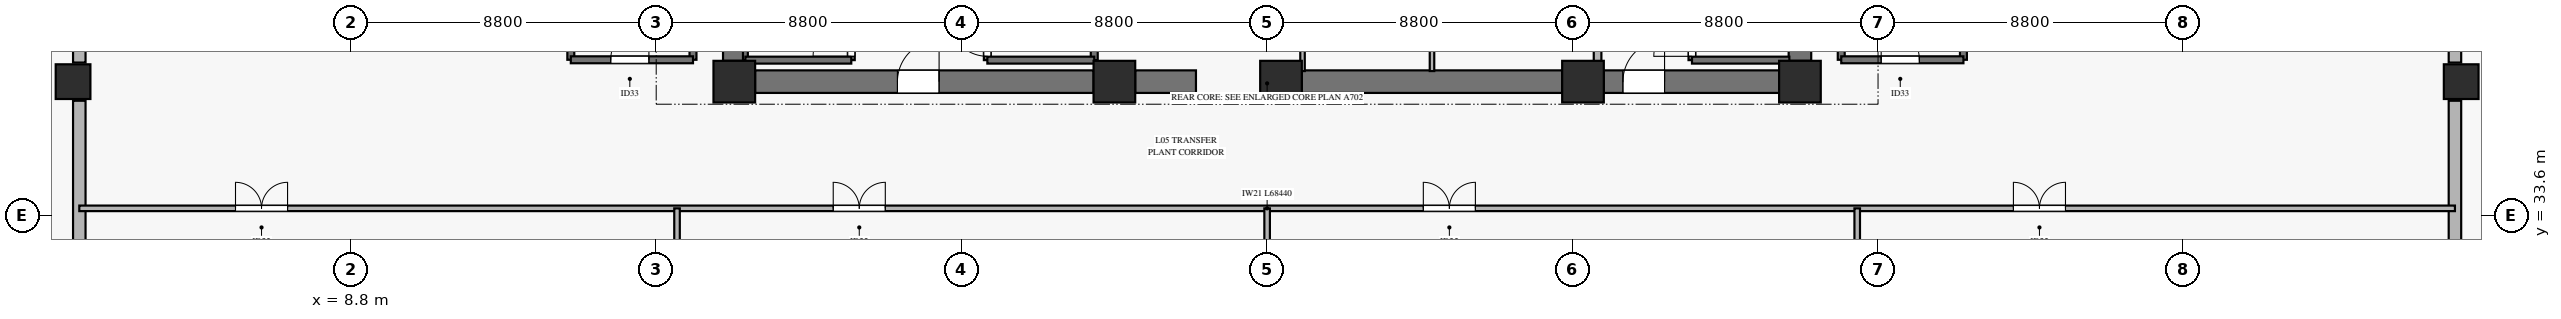
"""IFC4 building model, lengths in metres.
Left out: names, types, materials, properties, quantities, classifications, styles, units other than length and angle.
Written with IfcOpenShell. Run it as: python <this file> out.ifc"""

import sys

from ifc_helpers import new_model, si_unit, direction, frame, frame_2d, origin, origin_2d, place, context, subcontext, project, spatial, rectangle, hollow_rectangle, extrude, source, transform, mapped, element, fill, save


model = new_model("IFC4")
c1 = context("Model", 3, precision=1e-05, world=origin(), true_north=direction((0.0, 1.0)))
c2 = subcontext(c1, "Body", "Model", "MODEL_VIEW")
j1 = project(units=[si_unit("LENGTHUNIT", "METRE"), si_unit("PLANEANGLEUNIT", "RADIAN")], contexts=[c1])
p1 = place(None, origin())
s1 = spatial("IfcSite", under=j1, at=p1, CompositionType="ELEMENT")
p2 = place(p1, origin())
s2 = spatial("IfcBuilding", under=s1, at=p2, CompositionType="ELEMENT")
p3 = place(p2, frame((0.0, 0.0, 20.2)))
s3 = spatial("IfcBuildingStorey", under=s2, at=p3, CompositionType="ELEMENT", Elevation=20.2)
m1 = source(origin(), c2, "Body", "SweptSolid", [
    extrude(rectangle(XDim=1.2, YDim=1.2, at=origin_2d()), origin(), (0.0, 0.0, 1.0), 4.98),
])
for number, where, z_axis, x_axis in (
    (1, (19.85, 37.45, 0.0), (0.0, 0.0, 1.0), (1.0, 0.0, 0.0)),
    (2, (30.8, 37.45, 0.0), (0.0, 0.0, 1.0), (1.0, 0.0, 0.0)),
    (3, (35.6, 37.45, 0.0), (0.0, 0.0, 1.0), (1.0, 0.0, 0.0)),
    (4, (44.3, 37.45, 0.0), (0.0, 0.0, 1.0), (1.0, 0.0, 0.0)),
    (5, (50.55, 37.45, 0.0), (0.0, 0.0, 1.0), (1.0, 0.0, 0.0)),
):
    element("IfcColumn", number, at=place(p3, frame(where, z_axis=z_axis, x_axis=x_axis)), inside=s3, PredefinedType="PILASTER", context=c2, shape_type="MappedRepresentation", body=[
        mapped(m1, transform((0.0, 0.0, 0.0), x_axis=(1.0, 0.0, 0.0), y_axis=(0.0, 1.0, 0.0), z_axis=(0.0, 0.0, 1.0), scale=1.0)),
    ])
p4 = place(p3, frame((20.45, 37.45, 0.0), z_axis=(0.0, 0.0, 1.0), x_axis=(1.0, 0.0, 0.0)))
e6 = element("IfcWall", 6, at=p4, inside=s3, PredefinedType="SHEAR", context=c2, shape_type="SweptSolid", body=[
    extrude(rectangle(XDim=9.75, YDim=0.65, at=frame_2d((4.875, 0.0))), origin(), (0.0, 0.0, 1.0), 4.98),
])
p5 = place(p4, frame((4.1, 0.0, 0.0)))
e7 = element("IfcOpeningElement", 7, at=p5, cuts=e6, PredefinedType="OPENING", context=c2, shape_type="SweptSolid", body=[
    extrude(rectangle(XDim=1.2, YDim=2.15, at=frame_2d((0.6, 1.075))), frame((0.0, 0.335, 0.0), z_axis=(0.0, -1.0, 0.0), x_axis=(1.0, 0.0, 0.0)), (0.0, 0.0, 1.0), 0.67),
])
p6 = place(p3, frame((31.4, 37.45, 0.0), z_axis=(0.0, 0.0, 1.0), x_axis=(1.0, 0.0, 0.0)))
e8 = element("IfcWall", 8, at=p6, inside=s3, PredefinedType="SHEAR", context=c2, shape_type="SweptSolid", body=[
    extrude(rectangle(XDim=1.75, YDim=0.65, at=frame_2d((0.875, 0.0))), origin(), (0.0, 0.0, 1.0), 4.98),
])
p7 = place(p3, frame((36.2, 37.45, 0.0), z_axis=(0.0, 0.0, 1.0), x_axis=(1.0, 0.0, 0.0)))
e9 = element("IfcWall", 9, at=p7, inside=s3, PredefinedType="SHEAR", context=c2, shape_type="SweptSolid", body=[
    extrude(rectangle(XDim=7.5, YDim=0.65, at=frame_2d((3.75, 0.0))), origin(), (0.0, 0.0, 1.0), 4.98),
])
p8 = place(p3, frame((44.9, 37.45, 0.0), z_axis=(0.0, 0.0, 1.0), x_axis=(1.0, 0.0, 0.0)))
e10 = element("IfcWall", 10, at=p8, inside=s3, PredefinedType="SHEAR", context=c2, shape_type="SweptSolid", body=[
    extrude(rectangle(XDim=5.05, YDim=0.65, at=frame_2d((2.525, 0.0))), origin(), (0.0, 0.0, 1.0), 4.98),
])
p9 = place(p8, frame((0.55, 0.0, 0.0)))
e11 = element("IfcOpeningElement", 11, at=p9, cuts=e10, PredefinedType="OPENING", context=c2, shape_type="SweptSolid", body=[
    extrude(rectangle(XDim=1.2, YDim=2.15, at=frame_2d((0.6, 1.075))), frame((0.0, 0.335, 0.0), z_axis=(0.0, -1.0, 0.0), x_axis=(1.0, 0.0, 0.0)), (0.0, 0.0, 1.0), 0.67),
])
for number, where, z_axis, x_axis in (
    (12, (19.85, 38.05, 0.0), (0.0, 0.0, 1.0), (0.0, 1.0, 0.0)),
    (13, (50.55, 38.05, 0.0), (0.0, 0.0, 1.0), (0.0, 1.0, 0.0)),
):
    element("IfcWall", number, at=place(p3, frame(where, z_axis=z_axis, x_axis=x_axis)), inside=s3, PredefinedType="SHEAR", context=c2, shape_type="SweptSolid", body=[
        extrude(rectangle(XDim=7.9, YDim=0.65, at=frame_2d((3.95, 0.0))), origin(), (0.0, 0.0, 1.0), 4.98),
    ])
m2 = source(origin(), c2, "Body", "SweptSolid", [
    extrude(hollow_rectangle(XDim=1.0, YDim=1.0, WallThickness=0.045, at=origin_2d()), origin(), (0.0, 0.0, 1.0), 4.98),
])
for number, where, z_axis, x_axis in (
    (14, (0.8, 37.45, 0.0), (0.0, 0.0, 1.0), (1.0, 0.0, 0.0)),
    (15, (69.6, 37.45, 0.0), (0.0, 0.0, 1.0), (1.0, 0.0, 0.0)),
):
    element("IfcColumn", number, at=place(p3, frame(where, z_axis=z_axis, x_axis=x_axis)), inside=s3, PredefinedType="COLUMN", context=c2, shape_type="MappedRepresentation", body=[
        mapped(m2, transform((0.0, 0.0, 0.0), x_axis=(1.0, 0.0, 0.0), y_axis=(0.0, 1.0, 0.0), z_axis=(0.0, 0.0, 1.0), scale=1.0)),
    ])
p10 = place(p3, frame((0.98, 25.25, 0.0), z_axis=(0.0, 0.0, 1.0), x_axis=(0.0, 1.0, 0.0)))
e16 = element("IfcWall", 16, at=p10, inside=s3, PredefinedType="SOLIDWALL", context=c2, shape_type="SweptSolid", body=[
    extrude(rectangle(XDim=11.65, YDim=0.36, at=frame_2d((5.825, 0.0))), origin(), (0.0, 0.0, 1.0), 3.56),
])
p11 = place(p3, frame((0.98, 38.0, 0.0), z_axis=(0.0, 0.0, 1.0), x_axis=(0.0, 1.0, 0.0)))
e17 = element("IfcWall", 17, at=p11, inside=s3, PredefinedType="SOLIDWALL", context=c2, shape_type="SweptSolid", body=[
    extrude(rectangle(XDim=10.25, YDim=0.36, at=frame_2d((5.125, 0.0))), origin(), (0.0, 0.0, 1.0), 3.56),
])
p12 = place(p3, frame((69.42, 25.25, 0.0), z_axis=(0.0, 0.0, 1.0), x_axis=(0.0, 1.0, 0.0)))
e18 = element("IfcWall", 18, at=p12, inside=s3, PredefinedType="SOLIDWALL", context=c2, shape_type="SweptSolid", body=[
    extrude(rectangle(XDim=11.65, YDim=0.36, at=frame_2d((5.825, 0.0))), origin(), (0.0, 0.0, 1.0), 3.56),
])
p13 = place(p3, frame((69.42, 38.0, 0.0), z_axis=(0.0, 0.0, 1.0), x_axis=(0.0, 1.0, 0.0)))
e19 = element("IfcWall", 19, at=p13, inside=s3, PredefinedType="SOLIDWALL", context=c2, shape_type="SweptSolid", body=[
    extrude(rectangle(XDim=10.25, YDim=0.36, at=frame_2d((5.125, 0.0))), origin(), (0.0, 0.0, 1.0), 3.56),
])
p14 = place(p3, frame((20.17, 38.07, 0.0), z_axis=(0.0, 0.0, 1.0), x_axis=(0.0, 1.0, 0.0)))
e20 = element("IfcWall", 20, at=p14, inside=s3, PredefinedType="SOLIDWALL", context=c2, shape_type="SweptSolid", body=[
    extrude(rectangle(XDim=7.25, YDim=0.14, at=frame_2d((3.625, 0.0))), origin(), (0.0, 0.0, 1.0), 5.2),
])
p15 = place(p3, frame((23.22, 38.07, 0.0), z_axis=(0.0, 0.0, 1.0), x_axis=(0.0, 1.0, 0.0)))
e21 = element("IfcWall", 21, at=p15, inside=s3, PredefinedType="SOLIDWALL", context=c2, shape_type="SweptSolid", body=[
    extrude(rectangle(XDim=7.25, YDim=0.2, at=frame_2d((3.625, 0.0))), origin(), (0.0, 0.0, 1.0), 5.2),
])
p16 = place(p15, frame((0.11, 0.0, 0.0)))
e22 = element("IfcOpeningElement", 22, at=p16, cuts=e21, PredefinedType="OPENING", context=c2, shape_type="SweptSolid", body=[
    extrude(rectangle(XDim=1.1, YDim=2.15, at=frame_2d((0.55, 1.075))), frame((0.0, 0.11, 0.0), z_axis=(0.0, -1.0, 0.0), x_axis=(1.0, 0.0, 0.0)), (0.0, 0.0, 1.0), 0.22),
])
p17 = place(p3, frame((20.17, 38.07, 0.0), z_axis=(0.0, 0.0, 1.0), x_axis=(1.0, 0.0, 0.0)))
e23 = element("IfcWall", 23, at=p17, inside=s3, PredefinedType="SOLIDWALL", context=c2, shape_type="SweptSolid", body=[
    extrude(rectangle(XDim=3.05, YDim=0.2, at=frame_2d((1.525, 0.0))), origin(), (0.0, 0.0, 1.0), 5.2),
])
p18 = place(p3, frame((27.14, 38.07, 0.0), z_axis=(0.0, 0.0, 1.0), x_axis=(0.0, 1.0, 0.0)))
e24 = element("IfcWall", 24, at=p18, inside=s3, PredefinedType="SOLIDWALL", context=c2, shape_type="SweptSolid", body=[
    extrude(rectangle(XDim=7.25, YDim=0.2, at=frame_2d((3.625, 0.0))), origin(), (0.0, 0.0, 1.0), 5.2),
])
p19 = place(p18, frame((0.11, 0.0, 0.0)))
e25 = element("IfcOpeningElement", 25, at=p19, cuts=e24, PredefinedType="OPENING", context=c2, shape_type="SweptSolid", body=[
    extrude(rectangle(XDim=1.1, YDim=2.15, at=frame_2d((0.55, 1.075))), frame((0.0, 0.11, 0.0), z_axis=(0.0, -1.0, 0.0), x_axis=(1.0, 0.0, 0.0)), (0.0, 0.0, 1.0), 0.22),
])
p20 = place(p3, frame((30.22, 38.07, 0.0), z_axis=(0.0, 0.0, 1.0), x_axis=(0.0, 1.0, 0.0)))
e26 = element("IfcWall", 26, at=p20, inside=s3, PredefinedType="SOLIDWALL", context=c2, shape_type="SweptSolid", body=[
    extrude(rectangle(XDim=7.25, YDim=0.2, at=frame_2d((3.625, 0.0))), origin(), (0.0, 0.0, 1.0), 5.2),
])
p21 = place(p3, frame((27.14, 38.07, 0.0), z_axis=(0.0, 0.0, 1.0), x_axis=(1.0, 0.0, 0.0)))
e27 = element("IfcWall", 27, at=p21, inside=s3, PredefinedType="SOLIDWALL", context=c2, shape_type="SweptSolid", body=[
    extrude(rectangle(XDim=3.08, YDim=0.2, at=frame_2d((1.54, 0.0))), origin(), (0.0, 0.0, 1.0), 5.2),
])
p22 = place(p3, frame((47.44, 38.07, 0.0), z_axis=(0.0, 0.0, 1.0), x_axis=(0.0, 1.0, 0.0)))
e28 = element("IfcWall", 28, at=p22, inside=s3, PredefinedType="SOLIDWALL", context=c2, shape_type="SweptSolid", body=[
    extrude(rectangle(XDim=7.25, YDim=0.2, at=frame_2d((3.625, 0.0))), origin(), (0.0, 0.0, 1.0), 5.2),
])
p23 = place(p22, frame((0.11, 0.0, 0.0)))
e29 = element("IfcOpeningElement", 29, at=p23, cuts=e28, PredefinedType="OPENING", context=c2, shape_type="SweptSolid", body=[
    extrude(rectangle(XDim=1.1, YDim=2.15, at=frame_2d((0.55, 1.075))), frame((0.0, 0.11, 0.0), z_axis=(0.0, -1.0, 0.0), x_axis=(1.0, 0.0, 0.0)), (0.0, 0.0, 1.0), 0.22),
])
p24 = place(p3, frame((47.44, 38.07, 0.0), z_axis=(0.0, 0.0, 1.0), x_axis=(1.0, 0.0, 0.0)))
e30 = element("IfcWall", 30, at=p24, inside=s3, PredefinedType="SOLIDWALL", context=c2, shape_type="SweptSolid", body=[
    extrude(rectangle(XDim=2.805, YDim=0.2, at=frame_2d((1.403, 0.0))), origin(), (0.0, 0.0, 1.0), 5.2),
])
p25 = place(p3, frame((44.72, 37.755, 0.0), z_axis=(0.0, 0.0, 1.0), x_axis=(0.0, 1.0, 0.0)))
e31 = element("IfcWall", 31, at=p25, inside=s3, PredefinedType="SOLIDWALL", context=c2, shape_type="SweptSolid", body=[
    extrude(rectangle(XDim=7.465, YDim=0.22, at=frame_2d((3.732, 0.0))), origin(), (0.0, 0.0, 1.0), 4.98),
])
for number, where, z_axis, x_axis in (
    (32, (15.14, 38.08, 0.0), (0.0, 0.0, 1.0), (0.0, 1.0, 0.0)),
    (33, (18.66, 38.08, 0.0), (0.0, 0.0, 1.0), (0.0, 1.0, 0.0)),
):
    element("IfcWall", number, at=place(p3, frame(where, z_axis=z_axis, x_axis=x_axis)), inside=s3, PredefinedType="SOLIDWALL", context=c2, shape_type="SweptSolid", body=[
        extrude(rectangle(XDim=7.9, YDim=0.2, at=frame_2d((3.95, 0.0))), origin(), (0.0, 0.0, 1.0), 5.2),
    ])
p26 = place(p3, frame((15.14, 38.08, 0.0), z_axis=(0.0, 0.0, 1.0), x_axis=(1.0, 0.0, 0.0)))
e34 = element("IfcWall", 34, at=p26, inside=s3, PredefinedType="SOLIDWALL", context=c2, shape_type="SweptSolid", body=[
    extrude(rectangle(XDim=3.52, YDim=0.2, at=frame_2d((1.76, 0.0))), origin(), (0.0, 0.0, 1.0), 5.2),
])
p27 = place(p26, frame((1.15, 0.0, 0.0)))
e35 = element("IfcOpeningElement", 35, at=p27, cuts=e34, PredefinedType="OPENING", context=c2, shape_type="SweptSolid", body=[
    extrude(rectangle(XDim=1.1, YDim=2.15, at=frame_2d((0.55, 1.075))), frame((0.0, 0.11, 0.0), z_axis=(0.0, -1.0, 0.0), x_axis=(1.0, 0.0, 0.0)), (0.0, 0.0, 1.0), 0.22),
])
for number, where, z_axis, x_axis in (
    (36, (51.74, 38.08, 0.0), (0.0, 0.0, 1.0), (0.0, 1.0, 0.0)),
    (37, (55.26, 38.08, 0.0), (0.0, 0.0, 1.0), (0.0, 1.0, 0.0)),
):
    element("IfcWall", number, at=place(p3, frame(where, z_axis=z_axis, x_axis=x_axis)), inside=s3, PredefinedType="SOLIDWALL", context=c2, shape_type="SweptSolid", body=[
        extrude(rectangle(XDim=7.9, YDim=0.2, at=frame_2d((3.95, 0.0))), origin(), (0.0, 0.0, 1.0), 5.2),
    ])
p28 = place(p3, frame((51.74, 38.08, 0.0), z_axis=(0.0, 0.0, 1.0), x_axis=(1.0, 0.0, 0.0)))
e38 = element("IfcWall", 38, at=p28, inside=s3, PredefinedType="SOLIDWALL", context=c2, shape_type="SweptSolid", body=[
    extrude(rectangle(XDim=3.52, YDim=0.2, at=frame_2d((1.76, 0.0))), origin(), (0.0, 0.0, 1.0), 5.2),
])
p29 = place(p28, frame((1.15, 0.0, 0.0)))
e39 = element("IfcOpeningElement", 39, at=p29, cuts=e38, PredefinedType="OPENING", context=c2, shape_type="SweptSolid", body=[
    extrude(rectangle(XDim=1.1, YDim=2.15, at=frame_2d((0.55, 1.075))), frame((0.0, 0.11, 0.0), z_axis=(0.0, -1.0, 0.0), x_axis=(1.0, 0.0, 0.0)), (0.0, 0.0, 1.0), 0.22),
])
p30 = place(p3, frame((36.22, 37.755, 0.0), z_axis=(0.0, 0.0, 1.0), x_axis=(0.0, 1.0, 0.0)))
e40 = element("IfcWall", 40, at=p30, inside=s3, PredefinedType="PARTITIONING", context=c2, shape_type="SweptSolid", body=[
    extrude(rectangle(XDim=2.165, YDim=0.13, at=frame_2d((1.083, 0.0))), origin(), (0.0, 0.0, 1.0), 4.98),
])
p31 = place(p30, frame((0.855, 0.0, 0.0)))
e41 = element("IfcOpeningElement", 41, at=p31, cuts=e40, PredefinedType="OPENING", context=c2, shape_type="SweptSolid", body=[
    extrude(rectangle(XDim=0.9, YDim=2.1, at=frame_2d((0.45, 1.05))), frame((0.0, 0.075, 0.0), z_axis=(0.0, -1.0, 0.0), x_axis=(1.0, 0.0, 0.0)), (0.0, 0.0, 1.0), 0.15),
])
p32 = place(p3, frame((39.95, 37.755, 0.0), z_axis=(0.0, 0.0, 1.0), x_axis=(0.0, 1.0, 0.0)))
e42 = element("IfcWall", 42, at=p32, inside=s3, PredefinedType="PARTITIONING", context=c2, shape_type="SweptSolid", body=[
    extrude(rectangle(XDim=2.165, YDim=0.13, at=frame_2d((1.083, 0.0))), origin(), (0.0, 0.0, 1.0), 4.98),
])
p33 = place(p32, frame((0.565, 0.0, 0.0)))
e43 = element("IfcOpeningElement", 43, at=p33, cuts=e42, PredefinedType="OPENING", context=c2, shape_type="SweptSolid", body=[
    extrude(rectangle(XDim=0.9, YDim=2.1, at=frame_2d((0.45, 1.05))), frame((0.0, 0.075, 0.0), z_axis=(0.0, -1.0, 0.0), x_axis=(1.0, 0.0, 0.0)), (0.0, 0.0, 1.0), 0.15),
])
p34 = place(p3, frame((0.98, 33.8, 0.0), z_axis=(0.0, 0.0, 1.0), x_axis=(1.0, 0.0, 0.0)))
e44 = element("IfcWall", 44, at=p34, inside=s3, PredefinedType="PARTITIONING", context=c2, shape_type="SweptSolid", body=[
    extrude(rectangle(XDim=68.44, YDim=0.16, at=frame_2d((34.22, 0.0))), origin(), (0.0, 0.0, 1.0), 3.565),
])
p35 = place(p34, frame((4.5, 0.0, 0.0)))
e45 = element("IfcOpeningElement", 45, at=p35, cuts=e44, PredefinedType="OPENING", context=c2, shape_type="SweptSolid", body=[
    extrude(rectangle(XDim=1.5, YDim=2.2, at=frame_2d((0.75, 1.1))), frame((0.0, 0.09, 0.0), z_axis=(0.0, -1.0, 0.0), x_axis=(1.0, 0.0, 0.0)), (0.0, 0.0, 1.0), 0.18),
])
p36 = place(p34, frame((21.72, 0.0, 0.0)))
e46 = element("IfcOpeningElement", 46, at=p36, cuts=e44, PredefinedType="OPENING", context=c2, shape_type="SweptSolid", body=[
    extrude(rectangle(XDim=1.5, YDim=2.2, at=frame_2d((0.75, 1.1))), frame((0.0, 0.09, 0.0), z_axis=(0.0, -1.0, 0.0), x_axis=(1.0, 0.0, 0.0)), (0.0, 0.0, 1.0), 0.18),
])
p37 = place(p34, frame((38.72, 0.0, 0.0)))
e47 = element("IfcOpeningElement", 47, at=p37, cuts=e44, PredefinedType="OPENING", context=c2, shape_type="SweptSolid", body=[
    extrude(rectangle(XDim=1.5, YDim=2.2, at=frame_2d((0.75, 1.1))), frame((0.0, 0.09, 0.0), z_axis=(0.0, -1.0, 0.0), x_axis=(1.0, 0.0, 0.0)), (0.0, 0.0, 1.0), 0.18),
])
p38 = place(p34, frame((55.72, 0.0, 0.0)))
e48 = element("IfcOpeningElement", 48, at=p38, cuts=e44, PredefinedType="OPENING", context=c2, shape_type="SweptSolid", body=[
    extrude(rectangle(XDim=1.5, YDim=2.2, at=frame_2d((0.75, 1.1))), frame((0.0, 0.09, 0.0), z_axis=(0.0, -1.0, 0.0), x_axis=(1.0, 0.0, 0.0)), (0.0, 0.0, 1.0), 0.18),
])
for number, where, z_axis, x_axis in (
    (49, (18.2, 0.78, 0.0), (0.0, 0.0, 1.0), (0.0, 1.0, 0.0)),
    (50, (35.2, 0.78, 0.0), (0.0, 0.0, 1.0), (0.0, 1.0, 0.0)),
    (51, (52.2, 0.78, 0.0), (0.0, 0.0, 1.0), (0.0, 1.0, 0.0)),
):
    element("IfcWall", number, at=place(p3, frame(where, z_axis=z_axis, x_axis=x_axis)), inside=s3, PredefinedType="PARTITIONING", context=c2, shape_type="SweptSolid", body=[
        extrude(rectangle(XDim=33.02, YDim=0.16, at=frame_2d((16.51, 0.0))), origin(), (0.0, 0.0, 1.0), 3.565),
    ])
m3 = source(origin(), c2, "Body", "SweptSolid", [
    extrude(rectangle(XDim=1.1, YDim=2.15, at=frame_2d((0.55, 1.075))), frame((0.0, 0.025, 0.0), z_axis=(0.0, -1.0, 0.0), x_axis=(1.0, 0.0, 0.0)), (0.0, 0.0, 1.0), 0.05),
])
p39 = place(p16, origin())
e52 = element("IfcDoor", 52, at=p39, inside=s3, OperationType="SINGLE_SWING_LEFT", PredefinedType="DOOR", context=c2, shape_type="MappedRepresentation", body=[
    mapped(m3, transform((0.0, 0.0, 0.0), x_axis=(1.0, 0.0, 0.0), y_axis=(0.0, 1.0, 0.0), z_axis=(0.0, 0.0, 1.0), scale=1.0)),
])
fill(e22, e52)
p40 = place(p19, origin())
e53 = element("IfcDoor", 53, at=p40, inside=s3, OperationType="SINGLE_SWING_RIGHT", PredefinedType="DOOR", context=c2, shape_type="MappedRepresentation", body=[
    mapped(m3, transform((0.0, 0.0, 0.0), x_axis=(1.0, 0.0, 0.0), y_axis=(0.0, 1.0, 0.0), z_axis=(0.0, 0.0, 1.0), scale=1.0)),
])
fill(e25, e53)
p41 = place(p23, origin())
e54 = element("IfcDoor", 54, at=p41, inside=s3, OperationType="SINGLE_SWING_LEFT", PredefinedType="DOOR", context=c2, shape_type="MappedRepresentation", body=[
    mapped(m3, transform((0.0, 0.0, 0.0), x_axis=(1.0, 0.0, 0.0), y_axis=(0.0, 1.0, 0.0), z_axis=(0.0, 0.0, 1.0), scale=1.0)),
])
fill(e29, e54)
m4 = source(origin(), c2, "Body", "SweptSolid", [
    extrude(rectangle(XDim=1.2, YDim=2.15, at=frame_2d((0.6, 1.075))), frame((0.0, 0.025, 0.0), z_axis=(0.0, -1.0, 0.0), x_axis=(1.0, 0.0, 0.0)), (0.0, 0.0, 1.0), 0.05),
])
p42 = place(p5, origin())
e55 = element("IfcDoor", 55, at=p42, inside=s3, OperationType="SINGLE_SWING_RIGHT", PredefinedType="DOOR", context=c2, shape_type="MappedRepresentation", body=[
    mapped(m4, transform((0.0, 0.0, 0.0), x_axis=(1.0, 0.0, 0.0), y_axis=(0.0, 1.0, 0.0), z_axis=(0.0, 0.0, 1.0), scale=1.0)),
])
fill(e7, e55)
p43 = place(p9, origin())
e56 = element("IfcDoor", 56, at=p43, inside=s3, OperationType="SINGLE_SWING_RIGHT", PredefinedType="DOOR", context=c2, shape_type="MappedRepresentation", body=[
    mapped(m4, transform((0.0, 0.0, 0.0), x_axis=(1.0, 0.0, 0.0), y_axis=(0.0, 1.0, 0.0), z_axis=(0.0, 0.0, 1.0), scale=1.0)),
])
fill(e11, e56)
p44 = place(p27, origin())
e57 = element("IfcDoor", 57, at=p44, inside=s3, OperationType="SINGLE_SWING_RIGHT", PredefinedType="DOOR", context=c2, shape_type="MappedRepresentation", body=[
    mapped(m3, transform((0.0, 0.0, 0.0), x_axis=(1.0, 0.0, 0.0), y_axis=(0.0, 1.0, 0.0), z_axis=(0.0, 0.0, 1.0), scale=1.0)),
])
fill(e35, e57)
p45 = place(p29, origin())
e58 = element("IfcDoor", 58, at=p45, inside=s3, OperationType="SINGLE_SWING_LEFT", PredefinedType="DOOR", context=c2, shape_type="MappedRepresentation", body=[
    mapped(m3, transform((0.0, 0.0, 0.0), x_axis=(1.0, 0.0, 0.0), y_axis=(0.0, 1.0, 0.0), z_axis=(0.0, 0.0, 1.0), scale=1.0)),
])
fill(e39, e58)
m5 = source(origin(), c2, "Body", "SweptSolid", [
    extrude(rectangle(XDim=1.5, YDim=2.2, at=frame_2d((0.75, 1.1))), frame((0.0, 0.025, 0.0), z_axis=(0.0, -1.0, 0.0), x_axis=(1.0, 0.0, 0.0)), (0.0, 0.0, 1.0), 0.05),
])
p46 = place(p35, origin())
e59 = element("IfcDoor", 59, at=p46, inside=s3, OperationType="DOUBLE_SWING_LEFT", PredefinedType="DOOR", context=c2, shape_type="MappedRepresentation", body=[
    mapped(m5, transform((0.0, 0.0, 0.0), x_axis=(1.0, 0.0, 0.0), y_axis=(0.0, 1.0, 0.0), z_axis=(0.0, 0.0, 1.0), scale=1.0)),
])
fill(e45, e59)
p47 = place(p36, origin())
e60 = element("IfcDoor", 60, at=p47, inside=s3, OperationType="DOUBLE_SWING_LEFT", PredefinedType="DOOR", context=c2, shape_type="MappedRepresentation", body=[
    mapped(m5, transform((0.0, 0.0, 0.0), x_axis=(1.0, 0.0, 0.0), y_axis=(0.0, 1.0, 0.0), z_axis=(0.0, 0.0, 1.0), scale=1.0)),
])
fill(e46, e60)
p48 = place(p37, origin())
e61 = element("IfcDoor", 61, at=p48, inside=s3, OperationType="DOUBLE_SWING_LEFT", PredefinedType="DOOR", context=c2, shape_type="MappedRepresentation", body=[
    mapped(m5, transform((0.0, 0.0, 0.0), x_axis=(1.0, 0.0, 0.0), y_axis=(0.0, 1.0, 0.0), z_axis=(0.0, 0.0, 1.0), scale=1.0)),
])
fill(e47, e61)
p49 = place(p38, origin())
e62 = element("IfcDoor", 62, at=p49, inside=s3, OperationType="DOUBLE_SWING_LEFT", PredefinedType="DOOR", context=c2, shape_type="MappedRepresentation", body=[
    mapped(m5, transform((0.0, 0.0, 0.0), x_axis=(1.0, 0.0, 0.0), y_axis=(0.0, 1.0, 0.0), z_axis=(0.0, 0.0, 1.0), scale=1.0)),
])
fill(e48, e62)
save(model, sys.argv[1])
